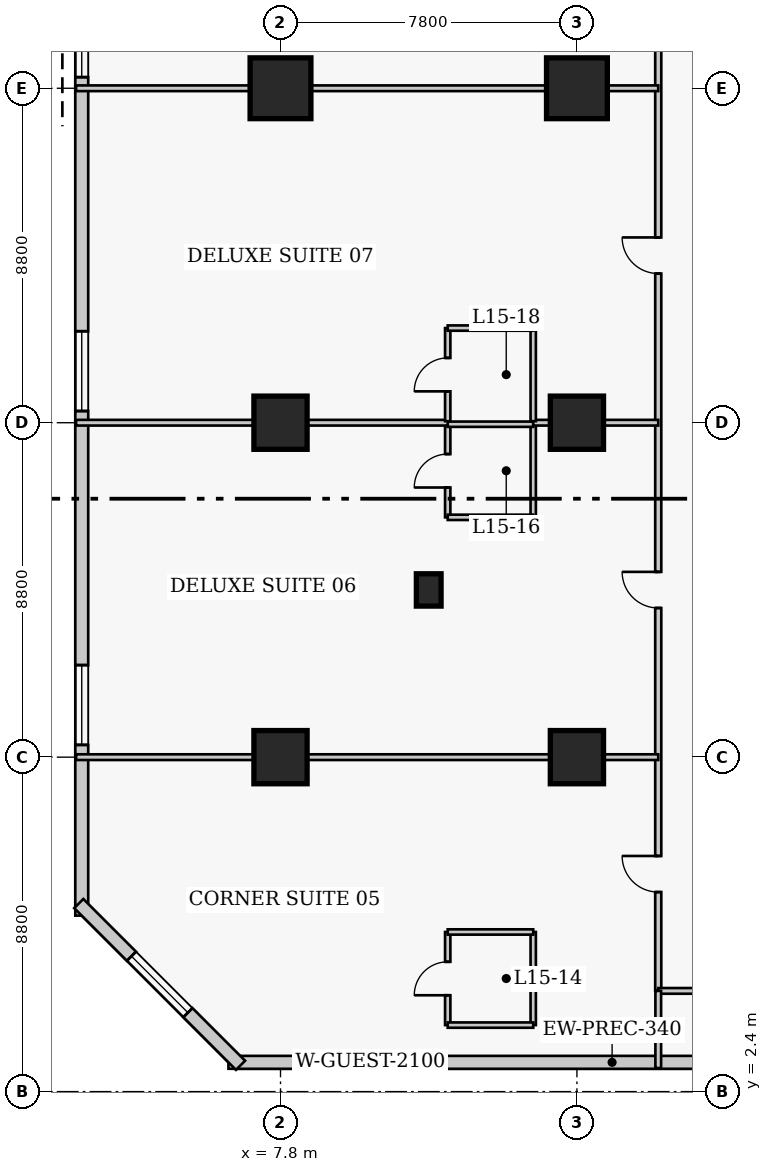
"""IFC4 building model, lengths in metres.
Left out: names, types, materials, properties, quantities, classifications, styles, units other than length and angle.
Written with IfcOpenShell. Run it as: python <this file> out.ifc"""

import sys

from ifc_helpers import new_model, si_unit, direction, frame, frame_2d, origin, origin_2d, place, context, subcontext, project, spatial, rectangle, extrude, element, fill, save


model = new_model("IFC4")
c1 = context("Model", 3, precision=1e-05, world=origin(), true_north=direction((0.0, 1.0)))
c2 = subcontext(c1, "Body", "Model", "MODEL_VIEW")
j1 = project(units=[si_unit("LENGTHUNIT", "METRE"), si_unit("PLANEANGLEUNIT", "RADIAN")], contexts=[c1])
p1 = place(None, origin())
s1 = spatial("IfcSite", under=j1, at=p1, CompositionType="ELEMENT")
p2 = place(p1, origin())
s2 = spatial("IfcBuilding", under=s1, at=p2, CompositionType="ELEMENT")
p3 = place(p2, frame((0.0, 0.0, 64.0)))
s3 = spatial("IfcBuildingStorey", under=s2, at=p3, CompositionType="ELEMENT", Elevation=64.0)
for number, where, z_axis, x_axis in (
    (1, (7.8, 11.2, 0.0), (0.0, 0.0, 1.0), (1.0, 0.0, 0.0)),
    (2, (7.8, 20.0, 0.0), (0.0, 0.0, 1.0), (1.0, 0.0, 0.0)),
):
    element("IfcColumn", number, at=place(p3, frame(where, z_axis=z_axis, x_axis=x_axis)), inside=s3, PredefinedType="COLUMN", context=c2, shape_type="SweptSolid", body=[
        extrude(rectangle(XDim=1.4, YDim=1.4, at=origin_2d()), origin(), (0.0, 0.0, 1.0), 3.8),
    ])
p4 = place(p3, frame((7.8, 28.8, 0.0), z_axis=(0.0, 0.0, 1.0), x_axis=(1.0, 0.0, 0.0)))
e3 = element("IfcColumn", 3, at=p4, inside=s3, PredefinedType="COLUMN", context=c2, shape_type="SweptSolid", body=[
    extrude(rectangle(XDim=1.6, YDim=1.6, at=origin_2d()), origin(), (0.0, 0.0, 1.0), 3.8),
])
for number, where, z_axis, x_axis in (
    (4, (15.6, 11.2, 0.0), (0.0, 0.0, 1.0), (1.0, 0.0, 0.0)),
    (5, (15.6, 20.0, 0.0), (0.0, 0.0, 1.0), (1.0, 0.0, 0.0)),
):
    element("IfcColumn", number, at=place(p3, frame(where, z_axis=z_axis, x_axis=x_axis)), inside=s3, PredefinedType="COLUMN", context=c2, shape_type="SweptSolid", body=[
        extrude(rectangle(XDim=1.4, YDim=1.4, at=origin_2d()), origin(), (0.0, 0.0, 1.0), 3.8),
    ])
p5 = place(p3, frame((15.6, 28.8, 0.0), z_axis=(0.0, 0.0, 1.0), x_axis=(1.0, 0.0, 0.0)))
e6 = element("IfcColumn", 6, at=p5, inside=s3, PredefinedType="COLUMN", context=c2, shape_type="SweptSolid", body=[
    extrude(rectangle(XDim=1.6, YDim=1.6, at=origin_2d()), origin(), (0.0, 0.0, 1.0), 3.8),
])
p6 = place(p3, frame((11.7, 15.6, 0.0), z_axis=(0.0, 0.0, 1.0), x_axis=(1.0, 0.0, 0.0)))
e7 = element("IfcColumn", 7, at=p6, inside=s3, PredefinedType="PILASTER", context=c2, shape_type="SweptSolid", body=[
    extrude(rectangle(XDim=0.65, YDim=0.85, at=origin_2d()), origin(), (0.0, 0.0, 1.0), 3.8),
])
p7 = place(p3, frame((6.43, 3.17, 0.0), z_axis=(0.0, 0.0, 1.0), x_axis=(1.0, 0.0, 0.0)))
e8 = element("IfcWall", 8, at=p7, inside=s3, PredefinedType="SOLIDWALL", context=c2, shape_type="SweptSolid", body=[
    extrude(rectangle(XDim=29.89, YDim=0.34, at=frame_2d((14.945, 0.0))), origin(), (0.0, 0.0, 1.0), 3.54),
])
p8 = place(p7, frame((20.17, 0.0, 0.0)))
e9 = element("IfcOpeningElement", 9, at=p8, cuts=e8, PredefinedType="OPENING", context=c2, shape_type="SweptSolid", body=[
    extrude(rectangle(XDim=1.4, YDim=2.15, at=frame_2d((0.7, 1.075))), frame((0.0, 0.18, 0.0), z_axis=(0.0, -1.0, 0.0), x_axis=(1.0, 0.0, 0.0)), (0.0, 0.0, 1.0), 0.36),
])
p9 = place(p7, frame((2.686, 0.0, 0.85)))
e10 = element("IfcOpeningElement", 10, at=p9, cuts=e8, PredefinedType="OPENING", context=c2, shape_type="SweptSolid", body=[
    extrude(rectangle(XDim=2.1, YDim=1.85, at=frame_2d((1.05, 0.925))), frame((0.0, 0.18, 0.0), z_axis=(0.0, -1.0, 0.0), x_axis=(1.0, 0.0, 0.0)), (0.0, 0.0, 1.0), 0.36),
])
p10 = place(p7, frame((25.104, 0.0, 0.85)))
e11 = element("IfcOpeningElement", 11, at=p10, cuts=e8, PredefinedType="OPENING", context=c2, shape_type="SweptSolid", body=[
    extrude(rectangle(XDim=2.1, YDim=1.85, at=frame_2d((1.05, 0.925))), frame((0.0, 0.18, 0.0), z_axis=(0.0, -1.0, 0.0), x_axis=(1.0, 0.0, 0.0)), (0.0, 0.0, 1.0), 0.36),
])
p11 = place(p7, frame((15.405, 0.0, 0.85)))
e12 = element("IfcOpeningElement", 12, at=p11, cuts=e8, PredefinedType="OPENING", context=c2, shape_type="SweptSolid", body=[
    extrude(rectangle(XDim=1.3, YDim=1.7, at=frame_2d((0.65, 0.85))), frame((0.0, 0.18, 0.0), z_axis=(0.0, -1.0, 0.0), x_axis=(1.0, 0.0, 0.0)), (0.0, 0.0, 1.0), 0.36),
])
p12 = place(p3, frame((2.57, 42.17, 0.0), z_axis=(0.0, 0.0, 1.0), x_axis=(0.0, -1.0, 0.0)))
e13 = element("IfcWall", 13, at=p12, inside=s3, PredefinedType="SOLIDWALL", context=c2, shape_type="SweptSolid", body=[
    extrude(rectangle(XDim=35.14, YDim=0.34, at=frame_2d((17.57, 0.0))), origin(), (0.0, 0.0, 1.0), 3.54),
])
p13 = place(p12, frame((2.692, 0.0, 0.85)))
e14 = element("IfcOpeningElement", 14, at=p13, cuts=e13, PredefinedType="OPENING", context=c2, shape_type="SweptSolid", body=[
    extrude(rectangle(XDim=2.1, YDim=1.85, at=frame_2d((1.05, 0.925))), frame((0.0, 0.18, 0.0), z_axis=(0.0, -1.0, 0.0), x_axis=(1.0, 0.0, 0.0)), (0.0, 0.0, 1.0), 0.36),
])
p14 = place(p12, frame((10.978, 0.0, 0.85)))
e15 = element("IfcOpeningElement", 15, at=p14, cuts=e13, PredefinedType="OPENING", context=c2, shape_type="SweptSolid", body=[
    extrude(rectangle(XDim=2.1, YDim=1.85, at=frame_2d((1.05, 0.925))), frame((0.0, 0.18, 0.0), z_axis=(0.0, -1.0, 0.0), x_axis=(1.0, 0.0, 0.0)), (0.0, 0.0, 1.0), 0.36),
])
p15 = place(p12, frame((19.762, 0.0, 0.85)))
e16 = element("IfcOpeningElement", 16, at=p15, cuts=e13, PredefinedType="OPENING", context=c2, shape_type="SweptSolid", body=[
    extrude(rectangle(XDim=2.1, YDim=1.85, at=frame_2d((1.05, 0.925))), frame((0.0, 0.18, 0.0), z_axis=(0.0, -1.0, 0.0), x_axis=(1.0, 0.0, 0.0)), (0.0, 0.0, 1.0), 0.36),
])
p16 = place(p12, frame((28.548, 0.0, 0.85)))
e17 = element("IfcOpeningElement", 17, at=p16, cuts=e13, PredefinedType="OPENING", context=c2, shape_type="SweptSolid", body=[
    extrude(rectangle(XDim=2.1, YDim=1.85, at=frame_2d((1.05, 0.925))), frame((0.0, 0.18, 0.0), z_axis=(0.0, -1.0, 0.0), x_axis=(1.0, 0.0, 0.0)), (0.0, 0.0, 1.0), 0.36),
])
p17 = place(p3, frame((2.492, 7.348, 0.0), z_axis=(0.0, 0.0, 1.0), x_axis=(0.707106781187, -0.707106781187, 0.0)))
e18 = element("IfcWall", 18, at=p17, inside=s3, PredefinedType="SOLIDWALL", context=c2, shape_type="SweptSolid", body=[
    extrude(rectangle(XDim=6.02, YDim=0.34, at=frame_2d((3.01, 0.0))), origin(), (0.0, 0.0, 1.0), 3.54),
])
p18 = place(p17, frame((1.96, 0.0, 0.85)))
e19 = element("IfcOpeningElement", 19, at=p18, cuts=e18, PredefinedType="OPENING", context=c2, shape_type="SweptSolid", body=[
    extrude(rectangle(XDim=2.1, YDim=1.85, at=frame_2d((1.05, 0.925))), frame((0.0, 0.18, 0.0), z_axis=(0.0, -1.0, 0.0), x_axis=(1.0, 0.0, 0.0)), (0.0, 0.0, 1.0), 0.36),
])
p19 = place(p3, frame((17.74, 5.05, 0.0), z_axis=(0.0, 0.0, 1.0), x_axis=(0.0, 1.0, 0.0)))
e20 = element("IfcWall", 20, at=p19, inside=s3, PredefinedType="PARTITIONING", context=c2, shape_type="SweptSolid", body=[
    extrude(rectangle(XDim=35.6, YDim=0.16, at=frame_2d((17.8, 0.0))), origin(), (0.0, 0.0, 1.0), 3.54),
])
p20 = place(p19, frame((2.6, 0.0, 0.0)))
e21 = element("IfcOpeningElement", 21, at=p20, cuts=e20, PredefinedType="OPENING", context=c2, shape_type="SweptSolid", body=[
    extrude(rectangle(XDim=0.95, YDim=2.1, at=frame_2d((0.475, 1.05))), frame((0.0, 0.09, 0.0), z_axis=(0.0, -1.0, 0.0), x_axis=(1.0, 0.0, 0.0)), (0.0, 0.0, 1.0), 0.18),
])
p21 = place(p19, frame((10.075, 0.0, 0.0)))
e22 = element("IfcOpeningElement", 22, at=p21, cuts=e20, PredefinedType="OPENING", context=c2, shape_type="SweptSolid", body=[
    extrude(rectangle(XDim=0.95, YDim=2.1, at=frame_2d((0.475, 1.05))), frame((0.0, 0.09, 0.0), z_axis=(0.0, -1.0, 0.0), x_axis=(1.0, 0.0, 0.0)), (0.0, 0.0, 1.0), 0.18),
])
p22 = place(p19, frame((18.875, 0.0, 0.0)))
e23 = element("IfcOpeningElement", 23, at=p22, cuts=e20, PredefinedType="OPENING", context=c2, shape_type="SweptSolid", body=[
    extrude(rectangle(XDim=0.95, YDim=2.1, at=frame_2d((0.475, 1.05))), frame((0.0, 0.09, 0.0), z_axis=(0.0, -1.0, 0.0), x_axis=(1.0, 0.0, 0.0)), (0.0, 0.0, 1.0), 0.18),
])
p23 = place(p19, frame((27.275, 0.0, 0.0)))
e24 = element("IfcOpeningElement", 24, at=p23, cuts=e20, PredefinedType="OPENING", context=c2, shape_type="SweptSolid", body=[
    extrude(rectangle(XDim=0.95, YDim=2.1, at=frame_2d((0.475, 1.05))), frame((0.0, 0.09, 0.0), z_axis=(0.0, -1.0, 0.0), x_axis=(1.0, 0.0, 0.0)), (0.0, 0.0, 1.0), 0.18),
])
p24 = place(p19, frame((33.986, 0.0, 0.0)))
e25 = element("IfcOpeningElement", 25, at=p24, cuts=e20, PredefinedType="OPENING", context=c2, shape_type="SweptSolid", body=[
    extrude(rectangle(XDim=1.0, YDim=2.15, at=frame_2d((0.5, 1.075))), frame((0.0, 0.09, 0.0), z_axis=(0.0, -1.0, 0.0), x_axis=(1.0, 0.0, 0.0)), (0.0, 0.0, 1.0), 0.18),
])
p25 = place(p3, frame((17.74, 5.05, 0.0), z_axis=(0.0, 0.0, 1.0), x_axis=(1.0, 0.0, 0.0)))
e26 = element("IfcWall", 26, at=p25, inside=s3, PredefinedType="PARTITIONING", context=c2, shape_type="SweptSolid", body=[
    extrude(rectangle(XDim=2.22, YDim=0.15, at=frame_2d((1.11, 0.0))), origin(), (0.0, 0.0, 1.0), 3.54),
])
p26 = place(p3, frame((17.74, 3.02, 0.0), z_axis=(0.0, 0.0, 1.0), x_axis=(0.0, 1.0, 0.0)))
e27 = element("IfcWall", 27, at=p26, inside=s3, PredefinedType="PARTITIONING", context=c2, shape_type="SweptSolid", body=[
    extrude(rectangle(XDim=2.03, YDim=0.15, at=frame_2d((1.015, 0.0))), origin(), (0.0, 0.0, 1.0), 3.54),
])
p27 = place(p3, frame((12.2, 4.15, 0.0), z_axis=(0.0, 0.0, 1.0), x_axis=(0.0, 1.0, 0.0)))
e28 = element("IfcWall", 28, at=p27, inside=s3, PredefinedType="PLUMBINGWALL", context=c2, shape_type="SweptSolid", body=[
    extrude(rectangle(XDim=2.45, YDim=0.14, at=frame_2d((1.225, 0.0))), origin(), (0.0, 0.0, 1.0), 3.54),
])
p28 = place(p27, frame((0.785, 0.0, 0.0)))
e29 = element("IfcOpeningElement", 29, at=p28, cuts=e28, PredefinedType="OPENING", context=c2, shape_type="SweptSolid", body=[
    extrude(rectangle(XDim=0.88, YDim=2.05, at=frame_2d((0.44, 1.025))), frame((0.0, 0.08, 0.0), z_axis=(0.0, -1.0, 0.0), x_axis=(1.0, 0.0, 0.0)), (0.0, 0.0, 1.0), 0.16),
])
p29 = place(p3, frame((14.45, 4.15, 0.0), z_axis=(0.0, 0.0, 1.0), x_axis=(0.0, 1.0, 0.0)))
e30 = element("IfcWall", 30, at=p29, inside=s3, PredefinedType="PLUMBINGWALL", context=c2, shape_type="SweptSolid", body=[
    extrude(rectangle(XDim=2.45, YDim=0.14, at=frame_2d((1.225, 0.0))), origin(), (0.0, 0.0, 1.0), 3.54),
])
for number, where, z_axis, x_axis in (
    (31, (12.2, 4.15, 0.0), (0.0, 0.0, 1.0), (1.0, 0.0, 0.0)),
    (32, (12.2, 6.6, 0.0), (0.0, 0.0, 1.0), (1.0, 0.0, 0.0)),
):
    element("IfcWall", number, at=place(p3, frame(where, z_axis=z_axis, x_axis=x_axis)), inside=s3, PredefinedType="PLUMBINGWALL", context=c2, shape_type="SweptSolid", body=[
        extrude(rectangle(XDim=2.25, YDim=0.14, at=frame_2d((1.125, 0.0))), origin(), (0.0, 0.0, 1.0), 3.54),
    ])
p30 = place(p3, frame((2.42, 11.2, 0.0), z_axis=(0.0, 0.0, 1.0), x_axis=(1.0, 0.0, 0.0)))
e33 = element("IfcWall", 33, at=p30, inside=s3, PredefinedType="PARTITIONING", context=c2, shape_type="SweptSolid", body=[
    extrude(rectangle(XDim=15.32, YDim=0.15, at=frame_2d((7.66, 0.0))), origin(), (0.0, 0.0, 1.0), 2.593),
])
p31 = place(p3, frame((12.2, 17.51, 0.0), z_axis=(0.0, 0.0, 1.0), x_axis=(0.0, 1.0, 0.0)))
e34 = element("IfcWall", 34, at=p31, inside=s3, PredefinedType="PLUMBINGWALL", context=c2, shape_type="SweptSolid", body=[
    extrude(rectangle(XDim=2.45, YDim=0.14, at=frame_2d((1.225, 0.0))), origin(), (0.0, 0.0, 1.0), 3.54),
])
p32 = place(p31, frame((0.785, 0.0, 0.0)))
e35 = element("IfcOpeningElement", 35, at=p32, cuts=e34, PredefinedType="OPENING", context=c2, shape_type="SweptSolid", body=[
    extrude(rectangle(XDim=0.88, YDim=2.05, at=frame_2d((0.44, 1.025))), frame((0.0, 0.08, 0.0), z_axis=(0.0, -1.0, 0.0), x_axis=(1.0, 0.0, 0.0)), (0.0, 0.0, 1.0), 0.16),
])
p33 = place(p3, frame((14.45, 17.51, 0.0), z_axis=(0.0, 0.0, 1.0), x_axis=(0.0, 1.0, 0.0)))
e36 = element("IfcWall", 36, at=p33, inside=s3, PredefinedType="PLUMBINGWALL", context=c2, shape_type="SweptSolid", body=[
    extrude(rectangle(XDim=2.45, YDim=0.14, at=frame_2d((1.225, 0.0))), origin(), (0.0, 0.0, 1.0), 3.54),
])
p34 = place(p3, frame((12.2, 17.51, 0.0), z_axis=(0.0, 0.0, 1.0), x_axis=(1.0, 0.0, 0.0)))
e37 = element("IfcWall", 37, at=p34, inside=s3, PredefinedType="PLUMBINGWALL", context=c2, shape_type="SweptSolid", body=[
    extrude(rectangle(XDim=2.25, YDim=0.14, at=frame_2d((1.125, 0.0))), origin(), (0.0, 0.0, 1.0), 3.54),
])
p35 = place(p3, frame((12.2, 19.96, 0.0), z_axis=(0.0, 0.0, 1.0), x_axis=(1.0, 0.0, 0.0)))
e38 = element("IfcWall", 38, at=p35, inside=s3, PredefinedType="PLUMBINGWALL", context=c2, shape_type="SweptSolid", body=[
    extrude(rectangle(XDim=2.25, YDim=0.14, at=frame_2d((1.125, 0.0))), origin(), (0.0, 0.0, 1.0), 2.593),
])
p36 = place(p3, frame((2.42, 20.0, 0.0), z_axis=(0.0, 0.0, 1.0), x_axis=(1.0, 0.0, 0.0)))
e39 = element("IfcWall", 39, at=p36, inside=s3, PredefinedType="PARTITIONING", context=c2, shape_type="SweptSolid", body=[
    extrude(rectangle(XDim=9.78, YDim=0.15, at=frame_2d((4.89, 0.0))), origin(), (0.0, 0.0, 1.0), 2.593),
])
p37 = place(p3, frame((14.45, 20.0, 0.0), z_axis=(0.0, 0.0, 1.0), x_axis=(1.0, 0.0, 0.0)))
e40 = element("IfcWall", 40, at=p37, inside=s3, PredefinedType="PARTITIONING", context=c2, shape_type="SweptSolid", body=[
    extrude(rectangle(XDim=3.29, YDim=0.15, at=frame_2d((1.645, 0.0))), origin(), (0.0, 0.0, 1.0), 2.593),
])
p38 = place(p3, frame((12.2, 20.04, 0.0), z_axis=(0.0, 0.0, 1.0), x_axis=(0.0, 1.0, 0.0)))
e41 = element("IfcWall", 41, at=p38, inside=s3, PredefinedType="PLUMBINGWALL", context=c2, shape_type="SweptSolid", body=[
    extrude(rectangle(XDim=2.45, YDim=0.14, at=frame_2d((1.225, 0.0))), origin(), (0.0, 0.0, 1.0), 3.54),
])
p39 = place(p38, frame((0.785, 0.0, 0.0)))
e42 = element("IfcOpeningElement", 42, at=p39, cuts=e41, PredefinedType="OPENING", context=c2, shape_type="SweptSolid", body=[
    extrude(rectangle(XDim=0.88, YDim=2.05, at=frame_2d((0.44, 1.025))), frame((0.0, 0.08, 0.0), z_axis=(0.0, -1.0, 0.0), x_axis=(1.0, 0.0, 0.0)), (0.0, 0.0, 1.0), 0.16),
])
p40 = place(p3, frame((14.45, 20.04, 0.0), z_axis=(0.0, 0.0, 1.0), x_axis=(0.0, 1.0, 0.0)))
e43 = element("IfcWall", 43, at=p40, inside=s3, PredefinedType="PLUMBINGWALL", context=c2, shape_type="SweptSolid", body=[
    extrude(rectangle(XDim=2.45, YDim=0.14, at=frame_2d((1.225, 0.0))), origin(), (0.0, 0.0, 1.0), 3.54),
])
p41 = place(p3, frame((12.2, 22.49, 0.0), z_axis=(0.0, 0.0, 1.0), x_axis=(1.0, 0.0, 0.0)))
e44 = element("IfcWall", 44, at=p41, inside=s3, PredefinedType="PLUMBINGWALL", context=c2, shape_type="SweptSolid", body=[
    extrude(rectangle(XDim=2.25, YDim=0.14, at=frame_2d((1.125, 0.0))), origin(), (0.0, 0.0, 1.0), 3.54),
])
p42 = place(p3, frame((2.42, 28.8, 0.0), z_axis=(0.0, 0.0, 1.0), x_axis=(1.0, 0.0, 0.0)))
e45 = element("IfcWall", 45, at=p42, inside=s3, PredefinedType="PARTITIONING", context=c2, shape_type="SweptSolid", body=[
    extrude(rectangle(XDim=15.32, YDim=0.15, at=frame_2d((7.66, 0.0))), origin(), (0.0, 0.0, 1.0), 2.593),
])
p43 = place(p9, origin())
e46 = element("IfcWindow", 46, at=p43, inside=s3, PartitioningType="SINGLE_PANEL", PredefinedType="WINDOW", context=c2, shape_type="SweptSolid", body=[
    extrude(rectangle(XDim=2.1, YDim=1.85, at=frame_2d((1.05, 0.925))), frame((0.0, 0.03, 0.0), z_axis=(0.0, -1.0, 0.0), x_axis=(1.0, 0.0, 0.0)), (0.0, 0.0, 1.0), 0.06),
])
fill(e10, e46)
p44 = place(p14, origin())
e47 = element("IfcWindow", 47, at=p44, inside=s3, PartitioningType="SINGLE_PANEL", PredefinedType="WINDOW", context=c2, shape_type="SweptSolid", body=[
    extrude(rectangle(XDim=2.1, YDim=1.85, at=frame_2d((1.05, 0.925))), frame((0.0, 0.03, 0.0), z_axis=(0.0, -1.0, 0.0), x_axis=(1.0, 0.0, 0.0)), (0.0, 0.0, 1.0), 0.06),
])
fill(e15, e47)
p45 = place(p15, origin())
e48 = element("IfcWindow", 48, at=p45, inside=s3, PartitioningType="SINGLE_PANEL", PredefinedType="WINDOW", context=c2, shape_type="SweptSolid", body=[
    extrude(rectangle(XDim=2.1, YDim=1.85, at=frame_2d((1.05, 0.925))), frame((0.0, 0.03, 0.0), z_axis=(0.0, -1.0, 0.0), x_axis=(1.0, 0.0, 0.0)), (0.0, 0.0, 1.0), 0.06),
])
fill(e16, e48)
p46 = place(p16, origin())
e49 = element("IfcWindow", 49, at=p46, inside=s3, PartitioningType="SINGLE_PANEL", PredefinedType="WINDOW", context=c2, shape_type="SweptSolid", body=[
    extrude(rectangle(XDim=2.1, YDim=1.85, at=frame_2d((1.05, 0.925))), frame((0.0, 0.03, 0.0), z_axis=(0.0, -1.0, 0.0), x_axis=(1.0, 0.0, 0.0)), (0.0, 0.0, 1.0), 0.06),
])
fill(e17, e49)
p47 = place(p18, origin())
e50 = element("IfcWindow", 50, at=p47, inside=s3, PartitioningType="SINGLE_PANEL", PredefinedType="WINDOW", context=c2, shape_type="SweptSolid", body=[
    extrude(rectangle(XDim=2.1, YDim=1.85, at=frame_2d((1.05, 0.925))), frame((0.0, 0.03, 0.0), z_axis=(0.0, -1.0, 0.0), x_axis=(1.0, 0.0, 0.0)), (0.0, 0.0, 1.0), 0.06),
])
fill(e19, e50)
p48 = place(p28, origin())
e51 = element("IfcDoor", 51, at=p48, inside=s3, OperationType="SINGLE_SWING_LEFT", PredefinedType="DOOR", context=c2, shape_type="SweptSolid", body=[
    extrude(rectangle(XDim=0.88, YDim=2.05, at=frame_2d((0.44, 1.025))), frame((0.0, 0.025, 0.0), z_axis=(0.0, -1.0, 0.0), x_axis=(1.0, 0.0, 0.0)), (0.0, 0.0, 1.0), 0.05),
])
fill(e29, e51)
p49 = place(p20, origin())
e52 = element("IfcDoor", 52, at=p49, inside=s3, OperationType="SINGLE_SWING_RIGHT", PredefinedType="DOOR", context=c2, shape_type="SweptSolid", body=[
    extrude(rectangle(XDim=0.95, YDim=2.1, at=frame_2d((0.475, 1.05))), frame((0.0, 0.025, 0.0), z_axis=(0.0, -1.0, 0.0), x_axis=(1.0, 0.0, 0.0)), (0.0, 0.0, 1.0), 0.05),
])
fill(e21, e52)
p50 = place(p32, origin())
e53 = element("IfcDoor", 53, at=p50, inside=s3, OperationType="SINGLE_SWING_LEFT", PredefinedType="DOOR", context=c2, shape_type="SweptSolid", body=[
    extrude(rectangle(XDim=0.88, YDim=2.05, at=frame_2d((0.44, 1.025))), frame((0.0, 0.025, 0.0), z_axis=(0.0, -1.0, 0.0), x_axis=(1.0, 0.0, 0.0)), (0.0, 0.0, 1.0), 0.05),
])
fill(e35, e53)
p51 = place(p21, origin())
e54 = element("IfcDoor", 54, at=p51, inside=s3, OperationType="SINGLE_SWING_RIGHT", PredefinedType="DOOR", context=c2, shape_type="SweptSolid", body=[
    extrude(rectangle(XDim=0.95, YDim=2.1, at=frame_2d((0.475, 1.05))), frame((0.0, 0.025, 0.0), z_axis=(0.0, -1.0, 0.0), x_axis=(1.0, 0.0, 0.0)), (0.0, 0.0, 1.0), 0.05),
])
fill(e22, e54)
p52 = place(p39, origin())
e55 = element("IfcDoor", 55, at=p52, inside=s3, OperationType="SINGLE_SWING_LEFT", PredefinedType="DOOR", context=c2, shape_type="SweptSolid", body=[
    extrude(rectangle(XDim=0.88, YDim=2.05, at=frame_2d((0.44, 1.025))), frame((0.0, 0.025, 0.0), z_axis=(0.0, -1.0, 0.0), x_axis=(1.0, 0.0, 0.0)), (0.0, 0.0, 1.0), 0.05),
])
fill(e42, e55)
p53 = place(p22, origin())
e56 = element("IfcDoor", 56, at=p53, inside=s3, OperationType="SINGLE_SWING_RIGHT", PredefinedType="DOOR", context=c2, shape_type="SweptSolid", body=[
    extrude(rectangle(XDim=0.95, YDim=2.1, at=frame_2d((0.475, 1.05))), frame((0.0, 0.025, 0.0), z_axis=(0.0, -1.0, 0.0), x_axis=(1.0, 0.0, 0.0)), (0.0, 0.0, 1.0), 0.05),
])
fill(e23, e56)
save(model, sys.argv[1])
